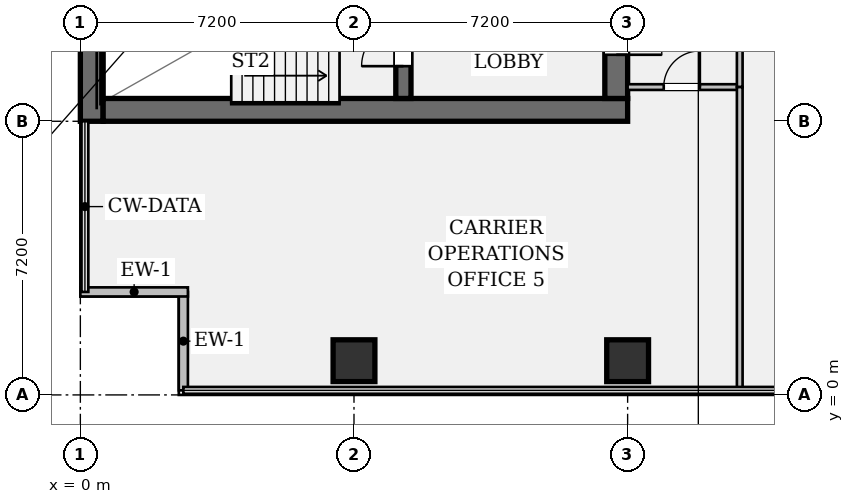
"""IFC4 building model, lengths in metres.
Left out: names, types, materials, properties, quantities, classifications, styles, units other than length and angle.
Written with IfcOpenShell. Run it as: python <this file> out.ifc"""

import sys

from ifc_helpers import new_model, si_unit, direction, frame, frame_2d, origin, origin_2d, place, context, subcontext, project, spatial, rectangle, hollow_rectangle, extrude, element, fill, save


model = new_model("IFC4")
c1 = context("Model", 3, precision=1e-05, world=origin(), true_north=direction((0.0, 1.0)))
c2 = subcontext(c1, "Body", "Model", "MODEL_VIEW")
j1 = project(units=[si_unit("LENGTHUNIT", "METRE"), si_unit("PLANEANGLEUNIT", "RADIAN")], contexts=[c1])
p1 = place(None, origin())
s1 = spatial("IfcSite", under=j1, at=p1, CompositionType="ELEMENT")
p2 = place(p1, origin())
s2 = spatial("IfcBuilding", under=s1, at=p2, CompositionType="ELEMENT")
p3 = place(p2, frame((0.0, 0.0, 38.85)))
s3 = spatial("IfcBuildingStorey", under=s2, at=p3, CompositionType="ELEMENT", Elevation=38.85)
p4 = place(p3, frame((0.3, 7.2, 0.0), z_axis=(0.0, 0.0, 1.0), x_axis=(0.0, 1.0, 0.0)))
e1 = element("IfcWall", 1, at=p4, inside=s3, PredefinedType="SHEAR", context=c2, shape_type="SweptSolid", body=[
    extrude(rectangle(XDim=28.8, YDim=0.6, at=frame_2d((14.4, 0.0))), origin(), (0.0, 0.0, 1.0), 3.57),
])
p5 = place(p3, frame((0.6, 7.5, 0.0), z_axis=(0.0, 0.0, 1.0), x_axis=(1.0, 0.0, 0.0)))
e2 = element("IfcWall", 2, at=p5, inside=s3, PredefinedType="SHEAR", context=c2, shape_type="SweptSolid", body=[
    extrude(rectangle(XDim=13.8, YDim=0.6, at=frame_2d((6.9, 0.0))), origin(), (0.0, 0.0, 1.0), 3.57),
])
p6 = place(p3, frame((14.1, 35.4, 0.0), z_axis=(0.0, 0.0, 1.0), x_axis=(0.0, -1.0, 0.0)))
e3 = element("IfcWall", 3, at=p6, inside=s3, PredefinedType="SHEAR", context=c2, shape_type="SweptSolid", body=[
    extrude(rectangle(XDim=27.6, YDim=0.6, at=frame_2d((13.8, 0.0))), origin(), (0.0, 0.0, 1.0), 3.57),
])
p7 = place(p6, frame((1.3, 0.0, 0.0)))
e4 = element("IfcOpeningElement", 4, at=p7, cuts=e3, PredefinedType="OPENING", context=c2, shape_type="SweptSolid", body=[
    extrude(rectangle(XDim=1.2, YDim=2.15, at=frame_2d((0.6, 1.075))), frame((0.0, 0.312, 0.0), z_axis=(0.0, -1.0, 0.0), x_axis=(1.0, 0.0, 0.0)), (0.0, 0.0, 1.0), 0.624),
])
p8 = place(p6, frame((25.25, 0.0, 0.0)))
e5 = element("IfcOpeningElement", 5, at=p8, cuts=e3, PredefinedType="OPENING", context=c2, shape_type="SweptSolid", body=[
    extrude(rectangle(XDim=1.2, YDim=2.15, at=frame_2d((0.6, 1.075))), frame((0.0, 0.312, 0.0), z_axis=(0.0, -1.0, 0.0), x_axis=(1.0, 0.0, 0.0)), (0.0, 0.0, 1.0), 0.624),
])
p9 = place(p6, frame((14.6, 0.0, 0.0)))
e6 = element("IfcOpeningElement", 6, at=p9, cuts=e3, PredefinedType="OPENING", context=c2, shape_type="SweptSolid", body=[
    extrude(rectangle(XDim=1.6, YDim=2.2, at=frame_2d((0.8, 1.1))), frame((0.0, 0.312, 0.0), z_axis=(0.0, -1.0, 0.0), x_axis=(1.0, 0.0, 0.0)), (0.0, 0.0, 1.0), 0.624),
])
p10 = place(p3, frame((8.5, 7.8, 0.0), z_axis=(0.0, 0.0, 1.0), x_axis=(0.0, 1.0, 0.0)))
e7 = element("IfcWall", 7, at=p10, inside=s3, PredefinedType="SHEAR", context=c2, shape_type="SweptSolid", body=[
    extrude(rectangle(XDim=3.68, YDim=0.4, at=frame_2d((1.84, 0.0))), origin(), (0.0, 0.0, 1.0), 3.57),
])
p11 = place(p10, frame((0.85, 0.0, 0.0)))
e8 = element("IfcOpeningElement", 8, at=p11, cuts=e7, PredefinedType="OPENING", context=c2, shape_type="SweptSolid", body=[
    extrude(rectangle(XDim=1.1, YDim=2.15, at=frame_2d((0.55, 1.075))), frame((0.0, 0.212, 0.0), z_axis=(0.0, -1.0, 0.0), x_axis=(1.0, 0.0, 0.0)), (0.0, 0.0, 1.0), 0.424),
])
for number, where, z_axis, x_axis in (
    (9, (7.2, 0.9, 0.0), (0.0, 0.0, 1.0), (1.0, 0.0, 0.0)),
    (10, (14.4, 0.9, 0.0), (0.0, 0.0, 1.0), (1.0, 0.0, 0.0)),
):
    element("IfcColumn", number, at=place(p3, frame(where, z_axis=z_axis, x_axis=x_axis)), inside=s3, PredefinedType="COLUMN", context=c2, shape_type="SweptSolid", body=[
        extrude(hollow_rectangle(XDim=1.1, YDim=1.1, WallThickness=0.07, at=origin_2d()), origin(), (0.0, 0.0, 1.0), 3.57),
    ])
p12 = place(p3, frame((2.71, 0.12, 0.0), z_axis=(0.0, 0.0, 1.0), x_axis=(0.0, 1.0, 0.0)))
e11 = element("IfcWall", 11, at=p12, inside=s3, PredefinedType="STANDARD", context=c2, shape_type="SweptSolid", body=[
    extrude(rectangle(XDim=2.59, YDim=0.24, at=frame_2d((1.295, 0.0))), origin(), (0.0, 0.0, 1.0), 3.57),
])
p13 = place(p3, frame((2.83, 2.71, 0.0), z_axis=(0.0, 0.0, 1.0), x_axis=(-1.0, 0.0, 0.0)))
e12 = element("IfcWall", 12, at=p13, inside=s3, PredefinedType="STANDARD", context=c2, shape_type="SweptSolid", body=[
    extrude(rectangle(XDim=2.83, YDim=0.24, at=frame_2d((1.415, 0.0))), origin(), (0.0, 0.0, 1.0), 3.57),
])
p14 = place(p3, frame((14.4, 8.1, 0.0), z_axis=(0.0, 0.0, 1.0), x_axis=(1.0, 0.0, 0.0)))
e13 = element("IfcWall", 13, at=p14, inside=s3, PredefinedType="PARTITIONING", context=c2, shape_type="SweptSolid", body=[
    extrude(rectangle(XDim=2.95, YDim=0.15, at=frame_2d((1.475, 0.0))), origin(), (0.0, 0.0, 1.0), 2.628),
])
p15 = place(p14, frame((0.95, 0.0, 0.0)))
e14 = element("IfcOpeningElement", 14, at=p15, cuts=e13, PredefinedType="OPENING", context=c2, shape_type="SweptSolid", body=[
    extrude(rectangle(XDim=0.95, YDim=2.15, at=frame_2d((0.475, 1.075))), frame((0.0, 0.087, 0.0), z_axis=(0.0, -1.0, 0.0), x_axis=(1.0, 0.0, 0.0)), (0.0, 0.0, 1.0), 0.174),
])
p16 = place(p3, frame((17.35, 8.1, 0.0), z_axis=(0.0, 0.0, 1.0), x_axis=(0.0, 1.0, 0.0)))
e15 = element("IfcWall", 15, at=p16, inside=s3, PredefinedType="PARTITIONING", context=c2, shape_type="SweptSolid", body=[
    extrude(rectangle(XDim=2.6, YDim=0.15, at=frame_2d((1.3, 0.0))), origin(), (0.0, 0.0, 1.0), 3.57),
])
p17 = place(p3, frame((17.35, 0.12, 0.0), z_axis=(0.0, 0.0, 1.0), x_axis=(0.0, 1.0, 0.0)))
e16 = element("IfcWall", 16, at=p17, inside=s3, PredefinedType="PARTITIONING", context=c2, shape_type="SweptSolid", body=[
    extrude(rectangle(XDim=7.98, YDim=0.15, at=frame_2d((3.99, 0.0))), origin(), (0.0, 0.0, 1.0), 2.628),
])
p18 = place(p11, origin())
e17 = element("IfcDoor", 17, at=p18, inside=s3, OperationType="SINGLE_SWING_LEFT", PredefinedType="DOOR", context=c2, shape_type="SweptSolid", body=[
    extrude(rectangle(XDim=1.1, YDim=2.15, at=frame_2d((0.55, 1.075))), frame((0.0, 0.025, 0.0), z_axis=(0.0, -1.0, 0.0), x_axis=(1.0, 0.0, 0.0)), (0.0, 0.0, 1.0), 0.05),
])
fill(e8, e17)
p19 = place(p8, origin())
e18 = element("IfcDoor", 18, at=p19, inside=s3, OperationType="SINGLE_SWING_RIGHT", PredefinedType="DOOR", context=c2, shape_type="SweptSolid", body=[
    extrude(rectangle(XDim=1.2, YDim=2.15, at=frame_2d((0.6, 1.075))), frame((0.0, 0.025, 0.0), z_axis=(0.0, -1.0, 0.0), x_axis=(1.0, 0.0, 0.0)), (0.0, 0.0, 1.0), 0.05),
])
fill(e5, e18)
p20 = place(p15, origin())
e19 = element("IfcDoor", 19, at=p20, inside=s3, OperationType="SINGLE_SWING_RIGHT", PredefinedType="DOOR", context=c2, shape_type="SweptSolid", body=[
    extrude(rectangle(XDim=0.95, YDim=2.15, at=frame_2d((0.475, 1.075))), frame((0.0, 0.025, 0.0), z_axis=(0.0, -1.0, 0.0), x_axis=(1.0, 0.0, 0.0)), (0.0, 0.0, 1.0), 0.05),
])
fill(e14, e19)
save(model, sys.argv[1])
